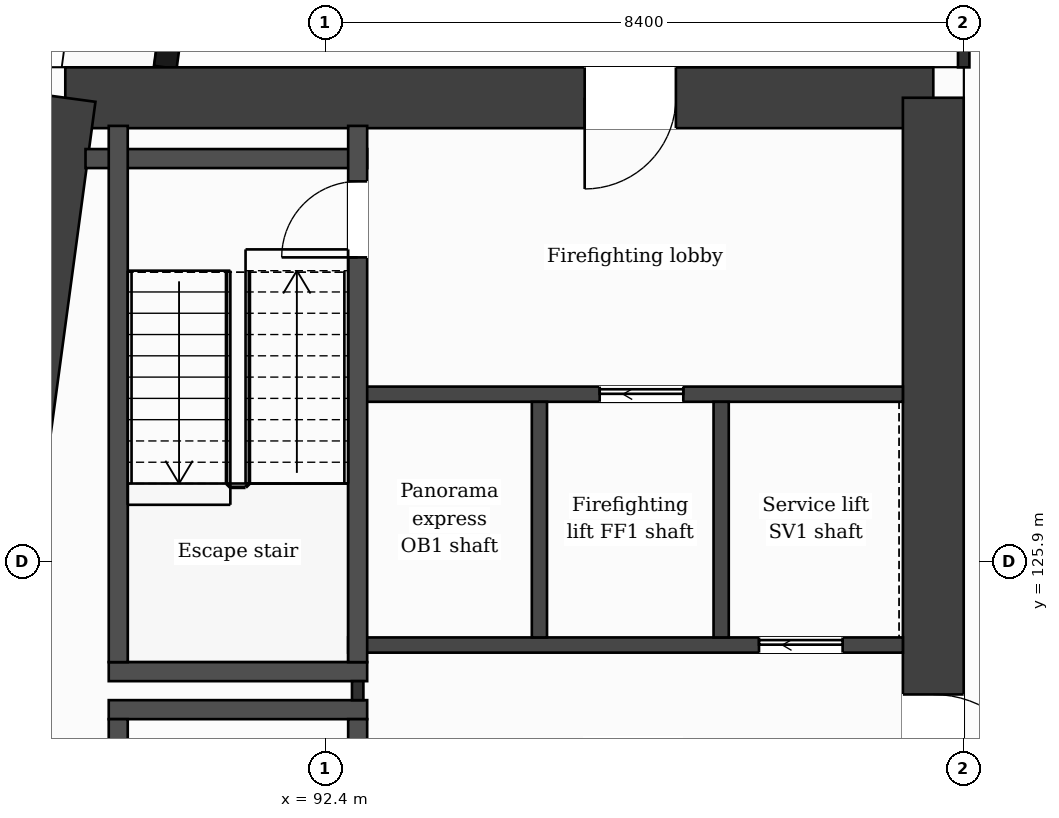
"""IFC4 building model, lengths in metres.
Left out: names, types, materials, properties, quantities, classifications, styles, units other than length and angle.
Written with IfcOpenShell. Run it as: python <this file> out.ifc"""

import sys

from ifc_helpers import new_model, si_unit, direction, frame, frame_2d, origin, place, context, subcontext, project, spatial, rectangle, extrude, element, fill, save


model = new_model("IFC4")
c1 = context("Model", 3, precision=1e-05, world=origin(), true_north=direction((0.0, 1.0)))
c2 = subcontext(c1, "Body", "Model", "MODEL_VIEW")
j1 = project(units=[si_unit("LENGTHUNIT", "METRE"), si_unit("PLANEANGLEUNIT", "RADIAN")], contexts=[c1])
p1 = place(None, origin())
s1 = spatial("IfcSite", under=j1, at=p1, CompositionType="ELEMENT")
p2 = place(p1, origin())
s2 = spatial("IfcBuilding", under=s1, at=p2, CompositionType="ELEMENT")
p3 = place(p2, frame((0.0, 0.0, 224.4)))
s3 = spatial("IfcBuildingStorey", under=s2, at=p3, CompositionType="ELEMENT", Elevation=224.4)
p4 = place(p3, frame((88.98, 132.0, 0.0), z_axis=(0.0, 0.0, 1.0), x_axis=(1.0, 0.0, 0.0)))
e1 = element("IfcWall", 1, at=p4, inside=s3, PredefinedType="SHEAR", context=c2, shape_type="SweptSolid", body=[
    extrude(rectangle(XDim=11.419, YDim=0.8, at=frame_2d((5.71, 0.0))), origin(), (0.0, 0.0, 1.0), 3.7),
])
p5 = place(p4, frame((6.833, 0.0, 0.0)))
e2 = element("IfcOpeningElement", 2, at=p5, cuts=e1, PredefinedType="OPENING", context=c2, shape_type="SweptSolid", body=[
    extrude(rectangle(XDim=1.2, YDim=2.1, at=frame_2d((0.6, 1.05))), frame((0.0, 0.41, 0.0), z_axis=(0.0, -1.0, 0.0), x_axis=(1.0, 0.0, 0.0)), (0.0, 0.0, 1.0), 0.82),
])
p6 = place(p3, frame((100.4, 132.0, 0.0), z_axis=(0.0, 0.0, 1.0), x_axis=(0.0, -1.0, 0.0)))
e3 = element("IfcWall", 3, at=p6, inside=s3, PredefinedType="SHEAR", context=c2, shape_type="SweptSolid", body=[
    extrude(rectangle(XDim=21.2, YDim=0.8, at=frame_2d((10.6, 0.0))), origin(), (0.0, 0.0, 1.0), 3.7),
])
p7 = place(p6, frame((7.85, 0.0, 0.0)))
e4 = element("IfcOpeningElement", 4, at=p7, cuts=e3, PredefinedType="OPENING", context=c2, shape_type="SweptSolid", body=[
    extrude(rectangle(XDim=1.4, YDim=2.1, at=frame_2d((0.7, 1.05))), frame((0.0, 0.41, 0.0), z_axis=(0.0, -1.0, 0.0), x_axis=(1.0, 0.0, 0.0)), (0.0, 0.0, 1.0), 0.82),
])
p8 = place(p3, frame((86.127, 110.8, 0.0), z_axis=(0.0, 0.0, 1.0), x_axis=(0.133408347329, 0.991061154956, 0.0)))
e5 = element("IfcWall", 5, at=p8, inside=s3, PredefinedType="SHEAR", context=c2, shape_type="SweptSolid", body=[
    extrude(rectangle(XDim=21.391, YDim=0.8, at=frame_2d((10.696, 0.0))), origin(), (0.0, 0.0, 1.0), 3.7),
])
p9 = place(p3, frame((91.177, 138.95, 0.0), z_axis=(0.0, 0.0, 1.0), x_axis=(-0.133426664613, -0.991058689065, 0.0)))
e6 = element("IfcWall", 6, at=p9, inside=s3, PredefinedType="SOLIDWALL", context=c2, shape_type="SweptSolid", body=[
    extrude(rectangle(XDim=6.609, YDim=0.3, at=frame_2d((3.305, 0.0))), origin(), (0.0, 0.0, 1.0), 3.38),
])
p10 = place(p9, frame((1.039, 0.0, 0.9)))
e7 = element("IfcOpeningElement", 7, at=p10, cuts=e6, PredefinedType="OPENING", context=c2, shape_type="SweptSolid", body=[
    extrude(rectangle(XDim=1.2, YDim=2.1, at=frame_2d((0.6, 1.05))), frame((0.0, 0.16, 0.0), z_axis=(0.0, -1.0, 0.0), x_axis=(1.0, 0.0, 0.0)), (0.0, 0.0, 1.0), 0.32),
])
p11 = place(p9, frame((4.294, 0.0, 0.0)))
e8 = element("IfcOpeningElement", 8, at=p11, cuts=e6, PredefinedType="OPENING", context=c2, shape_type="SweptSolid", body=[
    extrude(rectangle(XDim=1.2, YDim=2.4, at=frame_2d((0.6, 1.2))), frame((0.0, 0.16, 0.0), z_axis=(0.0, -1.0, 0.0), x_axis=(1.0, 0.0, 0.0)), (0.0, 0.0, 1.0), 0.32),
])
for number, where, z_axis, x_axis in (
    (9, (89.552, 123.95, 0.0), (0.0, 0.0, 1.0), (1.0, 0.0, 0.0)),
    (10, (89.552, 124.45, 0.0), (0.0, 0.0, 1.0), (1.0, 0.0, 0.0)),
):
    element("IfcWall", number, at=place(p3, frame(where, z_axis=z_axis, x_axis=x_axis)), inside=s3, PredefinedType="PARTITIONING", context=c2, shape_type="SweptSolid", body=[
        extrude(rectangle(XDim=3.4, YDim=0.25, at=frame_2d((1.7, 0.0))), origin(), (0.0, 0.0, 1.0), 3.38),
    ])
p12 = place(p3, frame((92.702, 124.8, 0.0), z_axis=(0.0, 0.0, 1.0), x_axis=(1.0, 0.0, 0.0)))
e11 = element("IfcWall", 11, at=p12, inside=s3, PredefinedType="PARTITIONING", context=c2, shape_type="SweptSolid", body=[
    extrude(rectangle(XDim=7.298, YDim=0.2, at=frame_2d((3.649, 0.0))), origin(), (0.0, 0.0, 1.0), 3.38),
])
p13 = place(p12, frame((5.405, 0.0, 0.0)))
e12 = element("IfcOpeningElement", 12, at=p13, cuts=e11, PredefinedType="OPENING", context=c2, shape_type="SweptSolid", body=[
    extrude(rectangle(XDim=1.1, YDim=2.1, at=frame_2d((0.55, 1.05))), frame((0.0, 0.11, 0.0), z_axis=(0.0, -1.0, 0.0), x_axis=(1.0, 0.0, 0.0)), (0.0, 0.0, 1.0), 0.22),
])
p14 = place(p3, frame((92.827, 128.1, 0.0), z_axis=(0.0, 0.0, 1.0), x_axis=(1.0, 0.0, 0.0)))
e13 = element("IfcWall", 13, at=p14, inside=s3, PredefinedType="PARTITIONING", context=c2, shape_type="SweptSolid", body=[
    extrude(rectangle(XDim=7.173, YDim=0.2, at=frame_2d((3.586, 0.0))), origin(), (0.0, 0.0, 1.0), 3.38),
])
p15 = place(p14, frame((3.184, 0.0, 0.0)))
e14 = element("IfcOpeningElement", 14, at=p15, cuts=e13, PredefinedType="OPENING", context=c2, shape_type="SweptSolid", body=[
    extrude(rectangle(XDim=1.1, YDim=2.1, at=frame_2d((0.55, 1.05))), frame((0.0, 0.11, 0.0), z_axis=(0.0, -1.0, 0.0), x_axis=(1.0, 0.0, 0.0)), (0.0, 0.0, 1.0), 0.22),
])
p16 = place(p3, frame((89.246, 131.2, 0.0), z_axis=(0.0, 0.0, 1.0), x_axis=(1.0, 0.0, 0.0)))
e15 = element("IfcWall", 15, at=p16, inside=s3, PredefinedType="PARTITIONING", context=c2, shape_type="SweptSolid", body=[
    extrude(rectangle(XDim=3.706, YDim=0.25, at=frame_2d((1.853, 0.0))), origin(), (0.0, 0.0, 1.0), 3.38),
])
for number, where, z_axis, x_axis in (
    (16, (89.677, 116.77, 0.0), (0.0, 0.0, 1.0), (0.0, 1.0, 0.0)),
    (17, (89.677, 124.575, 0.0), (0.0, 0.0, 1.0), (0.0, 1.0, 0.0)),
):
    element("IfcWall", number, at=place(p3, frame(where, z_axis=z_axis, x_axis=x_axis)), inside=s3, PredefinedType="PARTITIONING", context=c2, shape_type="SweptSolid", body=[
        extrude(rectangle(XDim=7.055, YDim=0.25, at=frame_2d((3.527, 0.0))), origin(), (0.0, 0.0, 1.0), 3.38),
    ])
p17 = place(p3, frame((92.827, 124.075, 0.0), z_axis=(0.0, 0.0, 1.0), x_axis=(0.0, 1.0, 0.0)))
e18 = element("IfcWall", 18, at=p17, inside=s3, PredefinedType="PARTITIONING", context=c2, shape_type="SweptSolid", body=[
    extrude(rectangle(XDim=0.25, YDim=0.15, at=frame_2d((0.125, 0.0))), origin(), (0.0, 0.0, 1.0), 3.38),
])
p18 = place(p3, frame((92.827, 116.77, 0.0), z_axis=(0.0, 0.0, 1.0), x_axis=(0.0, 1.0, 0.0)))
e19 = element("IfcWall", 19, at=p18, inside=s3, PredefinedType="PARTITIONING", context=c2, shape_type="SweptSolid", body=[
    extrude(rectangle(XDim=7.055, YDim=0.25, at=frame_2d((3.527, 0.0))), origin(), (0.0, 0.0, 1.0), 3.38),
])
p19 = place(p18, frame((5.755, 0.0, 0.0)))
e20 = element("IfcOpeningElement", 20, at=p19, cuts=e19, PredefinedType="OPENING", context=c2, shape_type="SweptSolid", body=[
    extrude(rectangle(XDim=0.95, YDim=2.1, at=frame_2d((0.475, 1.05))), frame((0.0, 0.135, 0.0), z_axis=(0.0, -1.0, 0.0), x_axis=(1.0, 0.0, 0.0)), (0.0, 0.0, 1.0), 0.27),
])
p20 = place(p3, frame((92.827, 124.575, 0.0), z_axis=(0.0, 0.0, 1.0), x_axis=(0.0, 1.0, 0.0)))
e21 = element("IfcWall", 21, at=p20, inside=s3, PredefinedType="PARTITIONING", context=c2, shape_type="SweptSolid", body=[
    extrude(rectangle(XDim=7.055, YDim=0.25, at=frame_2d((3.527, 0.0))), origin(), (0.0, 0.0, 1.0), 3.38),
])
p21 = place(p20, frame((5.325, 0.0, 0.0)))
e22 = element("IfcOpeningElement", 22, at=p21, cuts=e21, PredefinedType="OPENING", context=c2, shape_type="SweptSolid", body=[
    extrude(rectangle(XDim=1.0, YDim=2.1, at=frame_2d((0.5, 1.05))), frame((0.0, 0.135, 0.0), z_axis=(0.0, -1.0, 0.0), x_axis=(1.0, 0.0, 0.0)), (0.0, 0.0, 1.0), 0.27),
])
for number, where, z_axis, x_axis in (
    (23, (95.218, 124.9, 0.0), (0.0, 0.0, 1.0), (0.0, 1.0, 0.0)),
    (24, (97.609, 124.9, 0.0), (0.0, 0.0, 1.0), (0.0, 1.0, 0.0)),
):
    element("IfcWall", number, at=place(p3, frame(where, z_axis=z_axis, x_axis=x_axis)), inside=s3, PredefinedType="PARTITIONING", context=c2, shape_type="SweptSolid", body=[
        extrude(rectangle(XDim=3.1, YDim=0.2, at=frame_2d((1.55, 0.0))), origin(), (0.0, 0.0, 1.0), 3.38),
    ])
p22 = place(p3, frame((100.8, 132.4, 0.0), z_axis=(0.0, 0.0, 1.0), x_axis=(0.0, 1.0, 0.0)))
e25 = element("IfcWall", 25, at=p22, inside=s3, PredefinedType="PARTITIONING", context=c2, shape_type="SweptSolid", body=[
    extrude(rectangle(XDim=1.325, YDim=0.15, at=frame_2d((0.663, 0.0))), origin(), (0.0, 0.0, 1.0), 3.38),
])
p23 = place(p15, origin())
e26 = element("IfcDoor", 26, at=p23, inside=s3, OperationType="SLIDING_TO_LEFT", PredefinedType="DOOR", context=c2, shape_type="SweptSolid", body=[
    extrude(rectangle(XDim=1.1, YDim=2.1, at=frame_2d((0.55, 1.05))), frame((0.0, 0.025, 0.0), z_axis=(0.0, -1.0, 0.0), x_axis=(1.0, 0.0, 0.0)), (0.0, 0.0, 1.0), 0.05),
])
fill(e14, e26)
p24 = place(p13, origin())
e27 = element("IfcDoor", 27, at=p24, inside=s3, OperationType="SLIDING_TO_LEFT", PredefinedType="DOOR", context=c2, shape_type="SweptSolid", body=[
    extrude(rectangle(XDim=1.1, YDim=2.1, at=frame_2d((0.55, 1.05))), frame((0.0, 0.025, 0.0), z_axis=(0.0, -1.0, 0.0), x_axis=(1.0, 0.0, 0.0)), (0.0, 0.0, 1.0), 0.05),
])
fill(e12, e27)
p25 = place(p21, origin())
e28 = element("IfcDoor", 28, at=p25, inside=s3, OperationType="SINGLE_SWING_LEFT", PredefinedType="DOOR", context=c2, shape_type="SweptSolid", body=[
    extrude(rectangle(XDim=1.0, YDim=2.1, at=frame_2d((0.5, 1.05))), frame((0.0, 0.025, 0.0), z_axis=(0.0, -1.0, 0.0), x_axis=(1.0, 0.0, 0.0)), (0.0, 0.0, 1.0), 0.05),
])
fill(e22, e28)
p26 = place(p5, origin())
e29 = element("IfcDoor", 29, at=p26, inside=s3, OperationType="SINGLE_SWING_LEFT", PredefinedType="DOOR", context=c2, shape_type="SweptSolid", body=[
    extrude(rectangle(XDim=1.2, YDim=2.1, at=frame_2d((0.6, 1.05))), frame((0.0, 0.025, 0.0), z_axis=(0.0, -1.0, 0.0), x_axis=(1.0, 0.0, 0.0)), (0.0, 0.0, 1.0), 0.05),
])
fill(e2, e29)
p27 = place(p7, origin())
e30 = element("IfcDoor", 30, at=p27, inside=s3, OperationType="SINGLE_SWING_RIGHT", PredefinedType="DOOR", context=c2, shape_type="SweptSolid", body=[
    extrude(rectangle(XDim=1.4, YDim=2.1, at=frame_2d((0.7, 1.05))), frame((0.0, 0.025, 0.0), z_axis=(0.0, -1.0, 0.0), x_axis=(1.0, 0.0, 0.0)), (0.0, 0.0, 1.0), 0.05),
])
fill(e4, e30)
save(model, sys.argv[1])
